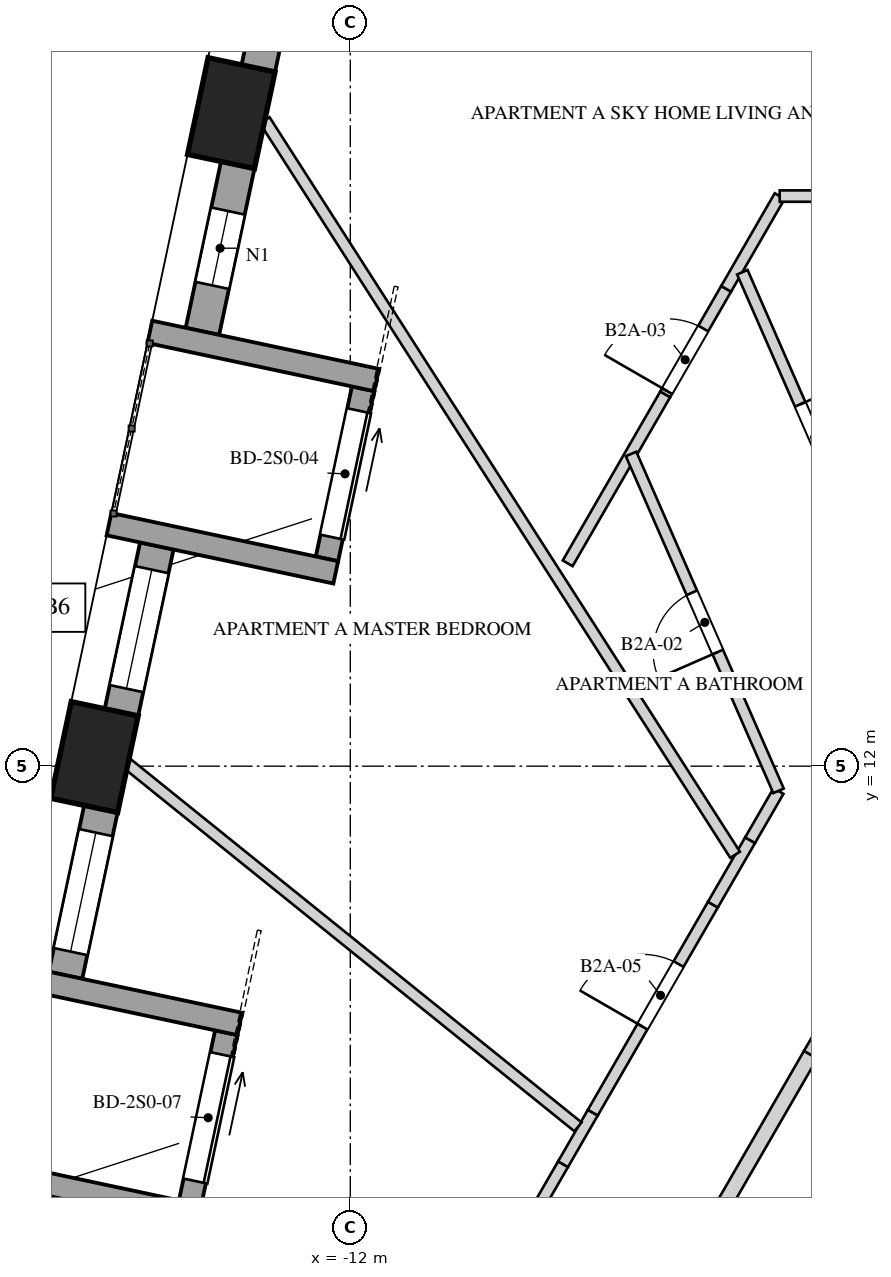
"""IFC4 building model, lengths in metres.
Left out: names, types, materials, properties, quantities, classifications, styles, units other than length and angle.
Written with IfcOpenShell. Run it as: python <this file> out.ifc"""

import sys

from ifc_helpers import new_model, si_unit, direction, frame, frame_2d, origin, origin_2d, place, context, subcontext, project, spatial, polyline, rectangle, outline, extrude, element, fill, save


model = new_model("IFC4")
c1 = context("Model", 3, precision=1e-05, world=origin(), true_north=direction((0.0, 1.0)))
c2 = subcontext(c1, "Body", "Model", "MODEL_VIEW")
j1 = project(units=[si_unit("LENGTHUNIT", "METRE"), si_unit("PLANEANGLEUNIT", "RADIAN")], contexts=[c1])
p1 = place(None, origin())
s1 = spatial("IfcSite", under=j1, at=p1, CompositionType="ELEMENT")
p2 = place(p1, origin())
s2 = spatial("IfcBuilding", under=s1, at=p2, CompositionType="ELEMENT")
p3 = place(p2, frame((0.0, 0.0, 88.4)))
s3 = spatial("IfcBuildingStorey", under=s2, at=p3, CompositionType="ELEMENT", Elevation=88.4)
p4 = place(p3, frame((-1.169, 10.525, 0.0), z_axis=(0.0, 0.0, 1.0), x_axis=(-0.499999102847, -0.866025921755, 0.0)))
e1 = element("IfcWall", 1, at=p4, inside=s3, PredefinedType="SHEAR", context=c2, shape_type="SweptSolid", body=[
    extrude(rectangle(XDim=17.061, YDim=0.95, at=frame_2d((8.53, 0.0))), origin(), (0.0, 0.0, 1.0), 4.0),
])
p5 = place(p4, frame((6.735, 0.0, 0.0)))
e2 = element("IfcOpeningElement", 2, at=p5, cuts=e1, PredefinedType="OPENING", context=c2, shape_type="SweptSolid", body=[
    extrude(rectangle(XDim=1.0, YDim=2.4, at=frame_2d((0.5, 1.2))), frame((0.0, 0.485, 0.0), z_axis=(0.0, -1.0, 0.0), x_axis=(1.0, 0.0, 0.0)), (0.0, 0.0, 1.0), 0.97),
])
p6 = place(p4, frame((14.613, 0.0, 0.0)))
e3 = element("IfcOpeningElement", 3, at=p6, cuts=e1, PredefinedType="OPENING", context=c2, shape_type="SweptSolid", body=[
    extrude(rectangle(XDim=0.8, YDim=2.1, at=frame_2d((0.4, 1.05))), frame((0.0, 0.485, 0.0), z_axis=(0.0, -1.0, 0.0), x_axis=(1.0, 0.0, 0.0)), (0.0, 0.0, 1.0), 0.97),
])
for number, where, z_axis, x_axis in (
    (4, (-13.565, 20.591, -0.35), (0.0, 0.0, 1.0), (-0.208, -0.978, 0.0)),
    (5, (-15.366, 12.12, -0.35), (0.0, 0.0, 1.0), (-0.208, -0.978, 0.0)),
):
    element("IfcColumn", number, at=place(p3, frame(where, z_axis=z_axis, x_axis=x_axis)), inside=s3, PredefinedType="COLUMN", context=c2, shape_type="SweptSolid", body=[
        extrude(rectangle(XDim=1.3, YDim=0.9, at=origin_2d()), origin(), (0.0, 0.0, 1.0), 4.35),
    ])
p7 = place(p3, frame((-12.745, 23.368, 0.0), z_axis=(0.0, 0.0, 1.0), x_axis=(-0.207941001029, -0.978141370197, 0.0)))
e6 = element("IfcWall", 6, at=p7, inside=s3, PredefinedType="SOLIDWALL", context=c2, shape_type="SweptSolid", body=[
    extrude(rectangle(XDim=2.237, YDim=0.45, at=frame_2d((1.118, 0.0))), origin(), (0.0, 0.0, 1.0), 3.3),
])
p8 = place(p7, frame((0.318, 0.0, 0.7)))
e7 = element("IfcOpeningElement", 7, at=p8, cuts=e6, PredefinedType="OPENING", context=c2, shape_type="SweptSolid", body=[
    extrude(rectangle(XDim=1.6, YDim=2.3, at=frame_2d((0.8, 1.15))), frame((0.0, 0.235, 0.0), z_axis=(0.0, -1.0, 0.0), x_axis=(1.0, 0.0, 0.0)), (0.0, 0.0, 1.0), 0.47),
])
p9 = place(p3, frame((-13.48, 19.908, 0.0), z_axis=(0.0, 0.0, 1.0), x_axis=(-0.207941001029, -0.978141370197, 0.0)))
e8 = element("IfcWall", 8, at=p9, inside=s3, PredefinedType="SOLIDWALL", context=c2, shape_type="SweptSolid", body=[
    extrude(rectangle(XDim=2.237, YDim=0.45, at=frame_2d((1.118, 0.0))), origin(), (0.0, 0.0, 1.0), 3.3),
])
p10 = place(p9, frame((0.618, 0.0, 0.7)))
e9 = element("IfcOpeningElement", 9, at=p10, cuts=e8, PredefinedType="OPENING", context=c2, shape_type="SweptSolid", body=[
    extrude(rectangle(XDim=1.0, YDim=2.3, at=frame_2d((0.5, 1.15))), frame((0.0, 0.235, 0.0), z_axis=(0.0, -1.0, 0.0), x_axis=(1.0, 0.0, 0.0)), (0.0, 0.0, 1.0), 0.47),
])
p11 = place(p3, frame((-14.546, 14.897, 0.0), z_axis=(0.0, 0.0, 1.0), x_axis=(-0.207941001029, -0.978141370197, 0.0)))
e10 = element("IfcWall", 10, at=p11, inside=s3, PredefinedType="SOLIDWALL", context=c2, shape_type="SweptSolid", body=[
    extrude(rectangle(XDim=2.237, YDim=0.45, at=frame_2d((1.118, 0.0))), origin(), (0.0, 0.0, 1.0), 3.3),
])
p12 = place(p11, frame((0.318, 0.0, 0.7)))
e11 = element("IfcOpeningElement", 11, at=p12, cuts=e10, PredefinedType="OPENING", context=c2, shape_type="SweptSolid", body=[
    extrude(rectangle(XDim=1.6, YDim=2.3, at=frame_2d((0.8, 1.15))), frame((0.0, 0.235, 0.0), z_axis=(0.0, -1.0, 0.0), x_axis=(1.0, 0.0, 0.0)), (0.0, 0.0, 1.0), 0.47),
])
p13 = place(p3, frame((-15.281, 11.437, 0.0), z_axis=(0.0, 0.0, 1.0), x_axis=(-0.207941001029, -0.978141370197, 0.0)))
e12 = element("IfcWall", 12, at=p13, inside=s3, PredefinedType="SOLIDWALL", context=c2, shape_type="SweptSolid", body=[
    extrude(rectangle(XDim=2.237, YDim=0.45, at=frame_2d((1.118, 0.0))), origin(), (0.0, 0.0, 1.0), 3.3),
])
p14 = place(p13, frame((0.318, 0.0, 0.7)))
e13 = element("IfcOpeningElement", 13, at=p14, cuts=e12, PredefinedType="OPENING", context=c2, shape_type="SweptSolid", body=[
    extrude(rectangle(XDim=1.6, YDim=2.3, at=frame_2d((0.8, 1.15))), frame((0.0, 0.235, 0.0), z_axis=(0.0, -1.0, 0.0), x_axis=(1.0, 0.0, 0.0)), (0.0, 0.0, 1.0), 0.47),
])
p15 = place(p3, frame((-11.832, 16.964, 0.0), z_axis=(0.0, 0.0, 1.0), x_axis=(-0.207866417042, -0.978157222877, 0.0)))
e14 = element("IfcWall", 14, at=p15, inside=s3, PredefinedType="SOLIDWALL", context=c2, shape_type="SweptSolid", body=[
    extrude(rectangle(XDim=2.287, YDim=0.3, at=frame_2d((1.144, 0.0))), origin(), (0.0, 0.0, 1.0), 3.3),
])
p16 = place(p15, frame((0.293, 0.0, 0.0)))
e15 = element("IfcOpeningElement", 15, at=p16, cuts=e14, PredefinedType="OPENING", context=c2, shape_type="SweptSolid", body=[
    extrude(rectangle(XDim=1.7, YDim=2.4, at=frame_2d((0.85, 1.2))), frame((0.0, 0.16, 0.0), z_axis=(0.0, -1.0, 0.0), x_axis=(1.0, 0.0, 0.0)), (0.0, 0.0, 1.0), 0.32),
])
for number, where, z_axis, x_axis in (
    (16, (-14.637, 17.714, 0.0), (0.0, 0.0, 1.0), (0.978, -0.208, 0.0)),
    (17, (-15.175, 15.184, 0.0), (0.0, 0.0, 1.0), (0.978, -0.208, 0.0)),
):
    element("IfcWall", number, at=place(p3, frame(where, z_axis=z_axis, x_axis=x_axis)), inside=s3, PredefinedType="SOLIDWALL", context=c2, shape_type="SweptSolid", body=[
        extrude(rectangle(XDim=3.05, YDim=0.3, at=frame_2d((1.525, 0.0))), origin(), (0.0, 0.0, 1.0), 3.3),
    ])
p17 = place(p3, frame((-13.632, 8.493, 0.0), z_axis=(0.0, 0.0, 1.0), x_axis=(-0.207866417042, -0.978157222877, 0.0)))
e18 = element("IfcWall", 18, at=p17, inside=s3, PredefinedType="SOLIDWALL", context=c2, shape_type="SweptSolid", body=[
    extrude(rectangle(XDim=2.287, YDim=0.3, at=frame_2d((1.144, 0.0))), origin(), (0.0, 0.0, 1.0), 3.3),
])
p18 = place(p17, frame((0.293, 0.0, 0.0)))
e19 = element("IfcOpeningElement", 19, at=p18, cuts=e18, PredefinedType="OPENING", context=c2, shape_type="SweptSolid", body=[
    extrude(rectangle(XDim=1.7, YDim=2.4, at=frame_2d((0.85, 1.2))), frame((0.0, 0.16, 0.0), z_axis=(0.0, -1.0, 0.0), x_axis=(1.0, 0.0, 0.0)), (0.0, 0.0, 1.0), 0.32),
])
for number, where, z_axis, x_axis in (
    (20, (-16.438, 9.243, 0.0), (0.0, 0.0, 1.0), (0.978, -0.208, 0.0)),
    (21, (-16.975, 6.713, 0.0), (0.0, 0.0, 1.0), (0.978, -0.208, 0.0)),
):
    element("IfcWall", number, at=place(p3, frame(where, z_axis=z_axis, x_axis=x_axis)), inside=s3, PredefinedType="SOLIDWALL", context=c2, shape_type="SweptSolid", body=[
        extrude(rectangle(XDim=3.05, YDim=0.3, at=frame_2d((1.525, 0.0))), origin(), (0.0, 0.0, 1.0), 3.3),
    ])
p19 = place(p3, frame((-11.496, 2.789, 0.0), z_axis=(0.0, 0.0, 1.0), x_axis=(0.499983361514, 0.866035009806, 0.0)))
e22 = element("IfcWall", 22, at=p19, inside=s3, PredefinedType="PARTITIONING", context=c2, shape_type="SweptSolid", body=[
    extrude(rectangle(XDim=4.59, YDim=0.15, at=frame_2d((2.295, 0.0))), origin(), (0.0, 0.0, 1.0), 3.65),
])
p20 = place(p19, frame((1.9, 0.0, 0.0)))
e23 = element("IfcOpeningElement", 23, at=p20, cuts=e22, PredefinedType="OPENING", context=c2, shape_type="SweptSolid", body=[
    extrude(rectangle(XDim=0.95, YDim=2.4, at=frame_2d((0.475, 1.2))), frame((0.0, 0.085, 0.0), z_axis=(0.0, -1.0, 0.0), x_axis=(1.0, 0.0, 0.0)), (0.0, 0.0, 1.0), 0.17),
])
p21 = place(p3, frame((-9.201, 6.764, 0.0), z_axis=(0.0, 0.0, 1.0), x_axis=(0.500028278809, 0.866009076391, 0.0)))
e24 = element("IfcWall", 24, at=p21, inside=s3, PredefinedType="PARTITIONING", context=c2, shape_type="SweptSolid", body=[
    extrude(rectangle(XDim=0.783, YDim=0.15, at=frame_2d((0.392, 0.0))), origin(), (0.0, 0.0, 1.0), 2.75),
])
p22 = place(p3, frame((-8.809, 7.442, 0.0), z_axis=(0.0, 0.0, 1.0), x_axis=(0.500003371769, 0.866023457084, 0.0)))
e25 = element("IfcWall", 25, at=p22, inside=s3, PredefinedType="PARTITIONING", context=c2, shape_type="SweptSolid", body=[
    extrude(rectangle(XDim=3.16, YDim=0.15, at=frame_2d((1.58, 0.0))), origin(), (0.0, 0.0, 1.0), 3.65),
])
p23 = place(p22, frame((1.307, 0.0, 0.0)))
e26 = element("IfcOpeningElement", 26, at=p23, cuts=e25, PredefinedType="OPENING", context=c2, shape_type="SweptSolid", body=[
    extrude(rectangle(XDim=0.95, YDim=2.4, at=frame_2d((0.475, 1.2))), frame((0.0, 0.085, 0.0), z_axis=(0.0, -1.0, 0.0), x_axis=(1.0, 0.0, 0.0)), (0.0, 0.0, 1.0), 0.17),
])
p24 = place(p3, frame((-7.229, 10.178, 0.0), z_axis=(0.0, 0.0, 1.0), x_axis=(0.500082280366, 0.865977893981, 0.0)))
e27 = element("IfcWall", 27, at=p24, inside=s3, PredefinedType="PARTITIONING", context=c2, shape_type="SweptSolid", body=[
    extrude(rectangle(XDim=0.979, YDim=0.15, at=frame_2d((0.489, 0.0))), origin(), (0.0, 0.0, 1.0), 2.55),
])
p25 = place(p3, frame((-6.74, 11.026, 0.0), z_axis=(0.0, 0.0, 1.0), x_axis=(0.499826079786, 0.866125793385, 0.0)))
e28 = element("IfcWall", 28, at=p25, inside=s3, PredefinedType="PARTITIONING", context=c2, shape_type="SweptSolid", body=[
    extrude(rectangle(XDim=0.748, YDim=0.15, at=frame_2d((0.374, 0.0))), origin(), (0.0, 0.0, 1.0), 3.65),
])
p26 = place(p3, frame((-9.14, 14.669, 0.0), z_axis=(0.0, 0.0, 1.0), x_axis=(0.500016107458, 0.866016103939, 0.0)))
e29 = element("IfcWall", 29, at=p26, inside=s3, PredefinedType="PARTITIONING", context=c2, shape_type="SweptSolid", body=[
    extrude(rectangle(XDim=2.567, YDim=0.15, at=frame_2d((1.283, 0.0))), origin(), (0.0, 0.0, 1.0), 3.65),
])
p27 = place(p3, frame((-7.857, 16.892, 0.0), z_axis=(0.0, 0.0, 1.0), x_axis=(0.499973003918, 0.866040989419, 0.0)))
e30 = element("IfcWall", 30, at=p27, inside=s3, PredefinedType="PARTITIONING", context=c2, shape_type="SweptSolid", body=[
    extrude(outline(polyline([(0.0, 0.0), (1.603, 0.0), (1.603, 2.55), (0.498, 2.55), (0.498, 3.65), (0.0, 3.65), (0.0, 0.0)])), frame((0.0, 0.075, 0.0), z_axis=(0.0, -1.0, 0.0), x_axis=(1.0, 0.0, 0.0)), (0.0, 0.0, 1.0), 0.15),
])
p28 = place(p27, frame((0.05, 0.0, 0.0)))
e31 = element("IfcOpeningElement", 31, at=p28, cuts=e30, PredefinedType="OPENING", context=c2, shape_type="SweptSolid", body=[
    extrude(rectangle(XDim=0.95, YDim=2.4, at=frame_2d((0.475, 1.2))), frame((0.0, 0.085, 0.0), z_axis=(0.0, -1.0, 0.0), x_axis=(1.0, 0.0, 0.0)), (0.0, 0.0, 1.0), 0.17),
])
p29 = place(p3, frame((-7.055, 18.28, 0.0), z_axis=(0.0, 0.0, 1.0), x_axis=(0.500052415518, 0.865995139556, 0.0)))
e32 = element("IfcWall", 32, at=p29, inside=s3, PredefinedType="PARTITIONING", context=c2, shape_type="SweptSolid", body=[
    extrude(rectangle(XDim=1.409, YDim=0.15, at=frame_2d((0.705, 0.0))), origin(), (0.0, 0.0, 1.0), 3.65),
])
p30 = place(p3, frame((-9.004, 7.255, 0.0), z_axis=(0.0, 0.0, 1.0), x_axis=(-0.778684200607, 0.627416062692, 0.0)))
e33 = element("IfcWall", 33, at=p30, inside=s3, PredefinedType="PARTITIONING", context=c2, shape_type="SweptSolid", body=[
    extrude(rectangle(XDim=7.605, YDim=0.15, at=frame_2d((3.802, 0.0))), origin(), (0.0, 0.0, 1.0), 2.75),
])
p31 = place(p3, frame((-6.938, 10.834, 0.0), z_axis=(0.0, 0.0, 1.0), x_axis=(-0.539252318239, 0.842144249683, 0.0)))
e34 = element("IfcWall", 34, at=p31, inside=s3, PredefinedType="PARTITIONING", context=c2, shape_type="SweptSolid", body=[
    extrude(rectangle(XDim=11.475, YDim=0.15, at=frame_2d((5.737, 0.0))), origin(), (0.0, 0.0, 1.0), 2.55),
])
p32 = place(p3, frame((-6.842, 18.499, 0.0), z_axis=(0.0, 0.0, 1.0), x_axis=(0.400991537582, -0.916081757698, 0.0)))
e35 = element("IfcWall", 35, at=p32, inside=s3, PredefinedType="PARTITIONING", context=c2, shape_type="SweptSolid", body=[
    extrude(rectangle(XDim=4.746, YDim=0.15, at=frame_2d((2.373, 0.0))), origin(), (0.0, 0.0, 1.0), 3.65),
])
p33 = place(p32, frame((1.898, 0.0, 0.0)))
e36 = element("IfcOpeningElement", 36, at=p33, cuts=e35, PredefinedType="OPENING", context=c2, shape_type="SweptSolid", body=[
    extrude(rectangle(XDim=0.95, YDim=2.4, at=frame_2d((0.475, 1.2))), frame((0.0, 0.085, 0.0), z_axis=(0.0, -1.0, 0.0), x_axis=(1.0, 0.0, 0.0)), (0.0, 0.0, 1.0), 0.17),
])
p34 = place(p3, frame((-6.366, 11.675, 0.0), z_axis=(0.0, 0.0, 1.0), x_axis=(-0.401014713365, 0.916071612738, 0.0)))
e37 = element("IfcWall", 37, at=p34, inside=s3, PredefinedType="PARTITIONING", context=c2, shape_type="SweptSolid", body=[
    extrude(rectangle(XDim=4.838, YDim=0.15, at=frame_2d((2.419, 0.0))), origin(), (0.0, 0.0, 1.0), 3.65),
])
p35 = place(p34, frame((1.994, 0.0, 0.0)))
e38 = element("IfcOpeningElement", 38, at=p35, cuts=e37, PredefinedType="OPENING", context=c2, shape_type="SweptSolid", body=[
    extrude(rectangle(XDim=0.85, YDim=2.4, at=frame_2d((0.425, 1.2))), frame((0.0, 0.085, 0.0), z_axis=(0.0, -1.0, 0.0), x_axis=(1.0, 0.0, 0.0)), (0.0, 0.0, 1.0), 0.17),
])
p36 = place(p3, frame((-6.351, 19.5, 0.0), z_axis=(0.0, 0.0, 1.0), x_axis=(1.0, 0.0, 0.0)))
e39 = element("IfcWall", 39, at=p36, inside=s3, PredefinedType="PARTITIONING", context=c2, shape_type="SweptSolid", body=[
    extrude(rectangle(XDim=1.177, YDim=0.15, at=frame_2d((0.589, 0.0))), origin(), (0.0, 0.0, 1.0), 3.65),
])
p37 = place(p3, frame((-7.137, 6.139, 0.0), z_axis=(0.0, 0.0, 1.0), x_axis=(0.500035462246, 0.866004928679, 0.0)))
e40 = element("IfcWall", 40, at=p37, inside=s3, PredefinedType="SOLIDWALL", context=c2, shape_type="SweptSolid", body=[
    extrude(rectangle(XDim=2.385, YDim=0.2, at=frame_2d((1.193, 0.0))), origin(), (0.0, 0.0, 1.0), 3.65),
])
p38 = place(p3, frame((-5.944, 8.205, 0.0), z_axis=(0.0, 0.0, 1.0), x_axis=(0.500051323872, 0.865995769906, 0.0)))
e41 = element("IfcWall", 41, at=p38, inside=s3, PredefinedType="SOLIDWALL", context=c2, shape_type="SweptSolid", body=[
    extrude(rectangle(XDim=1.007, YDim=0.2, at=frame_2d((0.503, 0.0))), origin(), (0.0, 0.0, 1.0), 2.55),
])
p39 = place(p10, origin())
e42 = element("IfcWindow", 42, at=p39, inside=s3, PartitioningType="SINGLE_PANEL", PredefinedType="WINDOW", context=c2, shape_type="SweptSolid", body=[
    extrude(rectangle(XDim=1.0, YDim=2.3, at=frame_2d((0.5, 1.15))), frame((0.0, 0.03, 0.0), z_axis=(0.0, -1.0, 0.0), x_axis=(1.0, 0.0, 0.0)), (0.0, 0.0, 1.0), 0.06),
])
fill(e9, e42)
p40 = place(p12, origin())
e43 = element("IfcWindow", 43, at=p40, inside=s3, PartitioningType="SINGLE_PANEL", PredefinedType="WINDOW", context=c2, shape_type="SweptSolid", body=[
    extrude(rectangle(XDim=1.6, YDim=2.3, at=frame_2d((0.8, 1.15))), frame((0.0, 0.03, 0.0), z_axis=(0.0, -1.0, 0.0), x_axis=(1.0, 0.0, 0.0)), (0.0, 0.0, 1.0), 0.06),
])
fill(e11, e43)
p41 = place(p14, origin())
e44 = element("IfcWindow", 44, at=p41, inside=s3, PartitioningType="SINGLE_PANEL", PredefinedType="WINDOW", context=c2, shape_type="SweptSolid", body=[
    extrude(rectangle(XDim=1.6, YDim=2.3, at=frame_2d((0.8, 1.15))), frame((0.0, 0.03, 0.0), z_axis=(0.0, -1.0, 0.0), x_axis=(1.0, 0.0, 0.0)), (0.0, 0.0, 1.0), 0.06),
])
fill(e13, e44)
p42 = place(p16, origin())
e45 = element("IfcDoor", 45, at=p42, inside=s3, OperationType="SLIDING_TO_LEFT", PredefinedType="DOOR", context=c2, shape_type="SweptSolid", body=[
    extrude(rectangle(XDim=1.7, YDim=2.4, at=frame_2d((0.85, 1.2))), frame((0.0, 0.025, 0.0), z_axis=(0.0, -1.0, 0.0), x_axis=(1.0, 0.0, 0.0)), (0.0, 0.0, 1.0), 0.05),
])
fill(e15, e45)
p43 = place(p18, origin())
e46 = element("IfcDoor", 46, at=p43, inside=s3, OperationType="SLIDING_TO_LEFT", PredefinedType="DOOR", context=c2, shape_type="SweptSolid", body=[
    extrude(rectangle(XDim=1.7, YDim=2.4, at=frame_2d((0.85, 1.2))), frame((0.0, 0.025, 0.0), z_axis=(0.0, -1.0, 0.0), x_axis=(1.0, 0.0, 0.0)), (0.0, 0.0, 1.0), 0.05),
])
fill(e19, e46)
p44 = place(p33, origin())
e47 = element("IfcDoor", 47, at=p44, inside=s3, OperationType="SINGLE_SWING_LEFT", PredefinedType="DOOR", context=c2, shape_type="SweptSolid", body=[
    extrude(rectangle(XDim=0.95, YDim=2.4, at=frame_2d((0.475, 1.2))), frame((0.0, 0.025, 0.0), z_axis=(0.0, -1.0, 0.0), x_axis=(1.0, 0.0, 0.0)), (0.0, 0.0, 1.0), 0.05),
])
fill(e36, e47)
p45 = place(p35, origin())
e48 = element("IfcDoor", 48, at=p45, inside=s3, OperationType="SINGLE_SWING_RIGHT", PredefinedType="DOOR", context=c2, shape_type="SweptSolid", body=[
    extrude(rectangle(XDim=0.85, YDim=2.4, at=frame_2d((0.425, 1.2))), frame((0.0, 0.025, 0.0), z_axis=(0.0, -1.0, 0.0), x_axis=(1.0, 0.0, 0.0)), (0.0, 0.0, 1.0), 0.05),
])
fill(e38, e48)
p46 = place(p28, origin())
e49 = element("IfcDoor", 49, at=p46, inside=s3, OperationType="SINGLE_SWING_LEFT", PredefinedType="DOOR", context=c2, shape_type="SweptSolid", body=[
    extrude(rectangle(XDim=0.95, YDim=2.4, at=frame_2d((0.475, 1.2))), frame((0.0, 0.025, 0.0), z_axis=(0.0, -1.0, 0.0), x_axis=(1.0, 0.0, 0.0)), (0.0, 0.0, 1.0), 0.05),
])
fill(e31, e49)
p47 = place(p23, origin())
e50 = element("IfcDoor", 50, at=p47, inside=s3, OperationType="SINGLE_SWING_LEFT", PredefinedType="DOOR", context=c2, shape_type="SweptSolid", body=[
    extrude(rectangle(XDim=0.95, YDim=2.4, at=frame_2d((0.475, 1.2))), frame((0.0, 0.025, 0.0), z_axis=(0.0, -1.0, 0.0), x_axis=(1.0, 0.0, 0.0)), (0.0, 0.0, 1.0), 0.05),
])
fill(e26, e50)
save(model, sys.argv[1])
